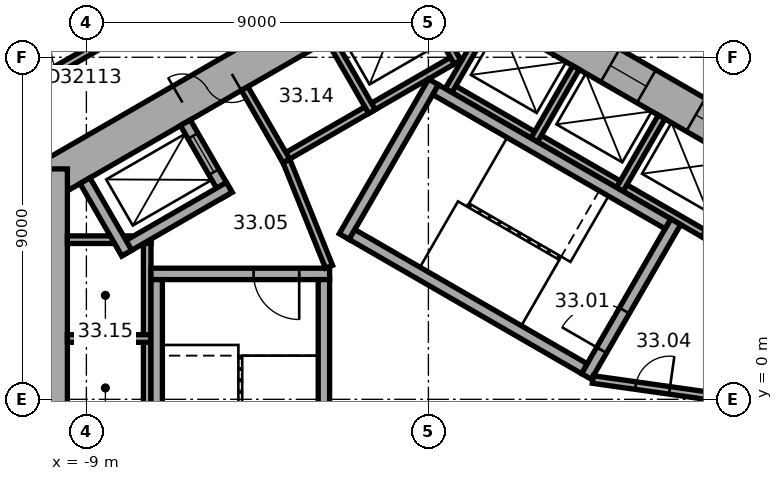
"""IFC4 building model, lengths in metres.
Left out: names, types, materials, properties, quantities, classifications, styles, units other than length and angle.
Written with IfcOpenShell. Run it as: python <this file> out.ifc"""

import sys

from ifc_helpers import new_model, si_unit, direction, frame, frame_2d, origin, place, context, subcontext, project, spatial, rectangle, extrude, element, fill, save


model = new_model("IFC4")
c1 = context("Model", 3, precision=1e-05, world=origin(), true_north=direction((0.0, 1.0)))
c2 = subcontext(c1, "Body", "Model", "MODEL_VIEW")
j1 = project(units=[si_unit("LENGTHUNIT", "METRE"), si_unit("PLANEANGLEUNIT", "RADIAN")], contexts=[c1])
p1 = place(None, origin())
s1 = spatial("IfcSite", under=j1, at=p1, CompositionType="ELEMENT")
p2 = place(p1, origin())
s2 = spatial("IfcBuilding", under=s1, at=p2, CompositionType="ELEMENT")
p3 = place(p2, frame((0.0, 0.0, 135.5)))
s3 = spatial("IfcBuildingStorey", under=s2, at=p3, CompositionType="ELEMENT", Elevation=135.5)
p4 = place(p3, frame((10.25, 5.629, 0.0), z_axis=(0.0, 0.0, 1.0), x_axis=(-0.866022616891, 0.50000482701, 0.0)))
e1 = element("IfcWall", 1, at=p4, inside=s3, PredefinedType="SHEAR", context=c2, shape_type="SweptSolid", body=[
    extrude(rectangle(XDim=12.125, YDim=1.0, at=frame_2d((6.062, 0.0))), origin(), (0.0, 0.0, 1.0), 3.7),
])
p5 = place(p4, frame((2.612, 0.0, 0.0)))
e2 = element("IfcOpeningElement", 2, at=p5, cuts=e1, PredefinedType="OPENING", context=c2, shape_type="SweptSolid", body=[
    extrude(rectangle(XDim=1.1, YDim=2.1, at=frame_2d((0.55, 1.05))), frame((0.0, 0.51, 0.0), z_axis=(0.0, -1.0, 0.0), x_axis=(1.0, 0.0, 0.0)), (0.0, 0.0, 1.0), 1.02),
])
p6 = place(p4, frame((5.212, 0.0, 0.0)))
e3 = element("IfcOpeningElement", 3, at=p6, cuts=e1, PredefinedType="OPENING", context=c2, shape_type="SweptSolid", body=[
    extrude(rectangle(XDim=1.1, YDim=2.1, at=frame_2d((0.55, 1.05))), frame((0.0, 0.51, 0.0), z_axis=(0.0, -1.0, 0.0), x_axis=(1.0, 0.0, 0.0)), (0.0, 0.0, 1.0), 1.02),
])
p7 = place(p4, frame((7.812, 0.0, 0.0)))
e4 = element("IfcOpeningElement", 4, at=p7, cuts=e1, PredefinedType="OPENING", context=c2, shape_type="SweptSolid", body=[
    extrude(rectangle(XDim=1.1, YDim=2.1, at=frame_2d((0.55, 1.05))), frame((0.0, 0.51, 0.0), z_axis=(0.0, -1.0, 0.0), x_axis=(1.0, 0.0, 0.0)), (0.0, 0.0, 1.0), 1.02),
])
p8 = place(p3, frame((0.25, 11.691, 0.0), z_axis=(0.0, 0.0, 1.0), x_axis=(-0.866022616891, -0.50000482701, 0.0)))
e5 = element("IfcWall", 5, at=p8, inside=s3, PredefinedType="SHEAR", context=c2, shape_type="SweptSolid", body=[
    extrude(rectangle(XDim=12.125, YDim=1.0, at=frame_2d((6.062, 0.0))), origin(), (0.0, 0.0, 1.0), 3.7),
])
p9 = place(p8, frame((6.262, 0.0, 0.0)))
e6 = element("IfcOpeningElement", 6, at=p9, cuts=e5, PredefinedType="OPENING", context=c2, shape_type="SweptSolid", body=[
    extrude(rectangle(XDim=1.5, YDim=2.1, at=frame_2d((0.75, 1.05))), frame((0.0, 0.51, 0.0), z_axis=(0.0, -1.0, 0.0), x_axis=(1.0, 0.0, 0.0)), (0.0, 0.0, 1.0), 1.02),
])
p10 = place(p8, frame((1.712, 0.0, 0.0)))
e7 = element("IfcOpeningElement", 7, at=p10, cuts=e5, PredefinedType="OPENING", context=c2, shape_type="SweptSolid", body=[
    extrude(rectangle(XDim=1.1, YDim=2.1, at=frame_2d((0.55, 1.05))), frame((0.0, 0.51, 0.0), z_axis=(0.0, -1.0, 0.0), x_axis=(1.0, 0.0, 0.0)), (0.0, 0.0, 1.0), 1.02),
])
p11 = place(p3, frame((-10.0, 6.062, 0.0), z_axis=(0.0, 0.0, 1.0), x_axis=(0.0, -1.0, 0.0)))
e8 = element("IfcWall", 8, at=p11, inside=s3, PredefinedType="SHEAR", context=c2, shape_type="SweptSolid", body=[
    extrude(rectangle(XDim=12.125, YDim=1.0, at=frame_2d((6.062, 0.0))), origin(), (0.0, 0.0, 1.0), 3.7),
])
p12 = place(p3, frame((7.424, 4.259, 0.0), z_axis=(0.0, 0.0, 1.0), x_axis=(-0.866026010844, 0.49999894854, 0.0)))
e9 = element("IfcWall", 9, at=p12, inside=s3, PredefinedType="PARTITIONING", context=c2, shape_type="SweptSolid", body=[
    extrude(rectangle(XDim=8.0, YDim=0.2, at=frame_2d((4.0, 0.0))), origin(), (0.0, 0.0, 1.0), 3.35),
])
for number, where, z_axis, x_axis in (
    (10, (7.287, 4.222, 0.0), (0.0, 0.0, 1.0), (0.5, 0.866, 0.0)),
    (11, (5.036, 5.522, 0.0), (0.0, 0.0, 1.0), (0.5, 0.866, 0.0)),
    (12, (2.784, 6.822, 0.0), (0.0, 0.0, 1.0), (0.5, 0.866, 0.0)),
    (13, (0.532, 8.122, 0.0), (0.0, 0.0, 1.0), (0.5, 0.866, 0.0)),
):
    element("IfcWall", number, at=place(p3, frame(where, z_axis=z_axis, x_axis=x_axis)), inside=s3, PredefinedType="PARTITIONING", context=c2, shape_type="SweptSolid", body=[
        extrude(rectangle(XDim=2.2, YDim=0.2, at=frame_2d((1.1, 0.0))), origin(), (0.0, 0.0, 1.0), 3.35),
    ])
p13 = place(p3, frame((0.803, 9.009, 0.0), z_axis=(0.0, 0.0, 1.0), x_axis=(-0.866028230842, -0.499995103361, 0.0)))
e14 = element("IfcWall", 14, at=p13, inside=s3, PredefinedType="PARTITIONING", context=c2, shape_type="SweptSolid", body=[
    extrude(rectangle(XDim=5.4, YDim=0.2, at=frame_2d((2.7, 0.0))), origin(), (0.0, 0.0, 1.0), 3.35),
])
p14 = place(p3, frame((0.767, 8.872, 0.0), z_axis=(0.0, 0.0, 1.0), x_axis=(-0.499994660107, 0.866028486751, 0.0)))
e15 = element("IfcWall", 15, at=p14, inside=s3, PredefinedType="PARTITIONING", context=c2, shape_type="SweptSolid", body=[
    extrude(rectangle(XDim=2.2, YDim=0.2, at=frame_2d((1.1, 0.0))), origin(), (0.0, 0.0, 1.0), 3.35),
])
for number, where, z_axis, x_axis in (
    (16, (-1.485, 7.572, 0.0), (0.0, 0.0, 1.0), (-0.5, 0.866, 0.0)),
    (17, (-3.737, 6.272, 0.0), (0.0, 0.0, 1.0), (-0.5, 0.866, 0.0)),
):
    element("IfcWall", number, at=place(p3, frame(where, z_axis=z_axis, x_axis=x_axis)), inside=s3, PredefinedType="PARTITIONING", context=c2, shape_type="SweptSolid", body=[
        extrude(rectangle(XDim=2.2, YDim=0.2, at=frame_2d((1.1, 0.0))), origin(), (0.0, 0.0, 1.0), 3.35),
    ])
p15 = place(p3, frame((-7.4, 4.3, 0.0), z_axis=(0.0, 0.0, 1.0), x_axis=(0.0, -1.0, 0.0)))
e18 = element("IfcWall", 18, at=p15, inside=s3, PredefinedType="PARTITIONING", context=c2, shape_type="SweptSolid", body=[
    extrude(rectangle(XDim=8.0, YDim=0.2, at=frame_2d((4.0, 0.0))), origin(), (0.0, 0.0, 1.0), 3.35),
])
for number, where, z_axis, x_axis in (
    (19, (-7.3, 4.2, 0.0), (0.0, 0.0, 1.0), (-1.0, 0.0, 0.0)),
    (20, (-7.3, 1.6, 0.0), (0.0, 0.0, 1.0), (-1.0, 0.0, 0.0)),
):
    element("IfcWall", number, at=place(p3, frame(where, z_axis=z_axis, x_axis=x_axis)), inside=s3, PredefinedType="PARTITIONING", context=c2, shape_type="SweptSolid", body=[
        extrude(rectangle(XDim=2.2, YDim=0.2, at=frame_2d((1.1, 0.0))), origin(), (0.0, 0.0, 1.0), 3.35),
    ])
p16 = place(p3, frame((4.158, 0.602, 0.0), z_axis=(0.0, 0.0, 1.0), x_axis=(0.499977259774, 0.866038532462, 0.0)))
e21 = element("IfcWall", 21, at=p16, inside=s3, PredefinedType="SHEAR", context=c2, shape_type="SweptSolid", body=[
    extrude(rectangle(XDim=4.7, YDim=0.3, at=frame_2d((2.35, 0.0))), origin(), (0.0, 0.0, 1.0), 3.35),
])
p17 = place(p16, frame((0.8, 0.0, 0.0)))
e22 = element("IfcOpeningElement", 22, at=p17, cuts=e21, PredefinedType="OPENING", context=c2, shape_type="SweptSolid", body=[
    extrude(rectangle(XDim=1.2, YDim=2.1, at=frame_2d((0.6, 1.05))), frame((0.0, 0.16, 0.0), z_axis=(0.0, -1.0, 0.0), x_axis=(1.0, 0.0, 0.0)), (0.0, 0.0, 1.0), 0.32),
])
p18 = place(p3, frame((-2.216, 4.282, 0.0), z_axis=(0.0, 0.0, 1.0), x_axis=(0.499977259774, 0.866038532462, 0.0)))
e23 = element("IfcWall", 23, at=p18, inside=s3, PredefinedType="SHEAR", context=c2, shape_type="SweptSolid", body=[
    extrude(rectangle(XDim=4.7, YDim=0.3, at=frame_2d((2.35, 0.0))), origin(), (0.0, 0.0, 1.0), 3.35),
])
for number, where, z_axis, x_axis in (
    (24, (4.103, 0.807, 0.0), (0.0, 0.0, 1.0), (-0.866, 0.5, 0.0)),
    (25, (6.303, 4.617, 0.0), (0.0, 0.0, 1.0), (-0.866, 0.5, 0.0)),
):
    element("IfcWall", number, at=place(p3, frame(where, z_axis=z_axis, x_axis=x_axis)), inside=s3, PredefinedType="SHEAR", context=c2, shape_type="SweptSolid", body=[
        extrude(rectangle(XDim=7.06, YDim=0.3, at=frame_2d((3.53, 0.0))), origin(), (0.0, 0.0, 1.0), 3.35),
    ])
p19 = place(p3, frame((-2.6, 3.3, 0.0), z_axis=(0.0, 0.0, 1.0), x_axis=(-1.0, 0.0, 0.0)))
e26 = element("IfcWall", 26, at=p19, inside=s3, PredefinedType="SHEAR", context=c2, shape_type="SweptSolid", body=[
    extrude(rectangle(XDim=4.7, YDim=0.3, at=frame_2d((2.35, 0.0))), origin(), (0.0, 0.0, 1.0), 3.35),
])
p20 = place(p19, frame((0.8, 0.0, 0.0)))
e27 = element("IfcOpeningElement", 27, at=p20, cuts=e26, PredefinedType="OPENING", context=c2, shape_type="SweptSolid", body=[
    extrude(rectangle(XDim=1.2, YDim=2.1, at=frame_2d((0.6, 1.05))), frame((0.0, 0.16, 0.0), z_axis=(0.0, -1.0, 0.0), x_axis=(1.0, 0.0, 0.0)), (0.0, 0.0, 1.0), 0.32),
])
for number, where, z_axis, x_axis in (
    (28, (-2.75, 3.15, 0.0), (0.0, 0.0, 1.0), (0.0, -1.0, 0.0)),
    (29, (-7.15, 3.15, 0.0), (0.0, 0.0, 1.0), (0.0, -1.0, 0.0)),
):
    element("IfcWall", number, at=place(p3, frame(where, z_axis=z_axis, x_axis=x_axis)), inside=s3, PredefinedType="SHEAR", context=c2, shape_type="SweptSolid", body=[
        extrude(rectangle(XDim=7.06, YDim=0.3, at=frame_2d((3.53, 0.0))), origin(), (0.0, 0.0, 1.0), 3.35),
    ])
p21 = place(p3, frame((4.327, 0.521, 0.0), z_axis=(0.0, 0.0, 1.0), x_axis=(0.990124376366, -0.14019172346, 0.0)))
e30 = element("IfcWall", 30, at=p21, inside=s3, PredefinedType="PARTITIONING", context=c2, shape_type="SweptSolid", body=[
    extrude(rectangle(XDim=3.002, YDim=0.2, at=frame_2d((1.501, 0.0))), origin(), (0.0, 0.0, 1.0), 3.35),
])
p22 = place(p21, frame((1.138, 0.0, 0.0)))
e31 = element("IfcOpeningElement", 31, at=p22, cuts=e30, PredefinedType="OPENING", context=c2, shape_type="SweptSolid", body=[
    extrude(rectangle(XDim=0.9, YDim=2.1, at=frame_2d((0.45, 1.05))), frame((0.0, 0.11, 0.0), z_axis=(0.0, -1.0, 0.0), x_axis=(1.0, 0.0, 0.0)), (0.0, 0.0, 1.0), 0.22),
])
p23 = place(p3, frame((-5.295, 5.372, 0.0), z_axis=(0.0, 0.0, 1.0), x_axis=(-0.500077893725, 0.86598042715, 0.0)))
e32 = element("IfcWall", 32, at=p23, inside=s3, PredefinedType="SHEAR", context=c2, shape_type="SweptSolid", body=[
    extrude(rectangle(XDim=2.2, YDim=0.3, at=frame_2d((1.1, 0.0))), origin(), (0.0, 0.0, 1.0), 3.35),
])
p24 = place(p23, frame((0.7, 0.0, 0.0)))
e33 = element("IfcOpeningElement", 33, at=p24, cuts=e32, PredefinedType="OPENING", context=c2, shape_type="SweptSolid", body=[
    extrude(rectangle(XDim=1.1, YDim=2.1, at=frame_2d((0.55, 1.05))), frame((0.0, 0.16, 0.0), z_axis=(0.0, -1.0, 0.0), x_axis=(1.0, 0.0, 0.0)), (0.0, 0.0, 1.0), 0.32),
])
p25 = place(p3, frame((-5.24, 5.577, 0.0), z_axis=(0.0, 0.0, 1.0), x_axis=(-0.866014461049, -0.500018952895, 0.0)))
e34 = element("IfcWall", 34, at=p25, inside=s3, PredefinedType="SHEAR", context=c2, shape_type="SweptSolid", body=[
    extrude(rectangle(XDim=3.35, YDim=0.3, at=frame_2d((1.675, 0.0))), origin(), (0.0, 0.0, 1.0), 3.35),
])
p26 = place(p3, frame((-7.937, 3.847, 0.0), z_axis=(0.0, 0.0, 1.0), x_axis=(-0.50002983664, 0.866008176907, 0.0)))
e35 = element("IfcWall", 35, at=p26, inside=s3, PredefinedType="SHEAR", context=c2, shape_type="SweptSolid", body=[
    extrude(rectangle(XDim=2.2, YDim=0.3, at=frame_2d((1.1, 0.0))), origin(), (0.0, 0.0, 1.0), 3.35),
])
p27 = place(p3, frame((-2.615, 3.487, 0.0), z_axis=(0.0, 0.0, 1.0), x_axis=(-0.373576831041, 0.92759924068, 0.0)))
e36 = element("IfcWall", 36, at=p27, inside=s3, PredefinedType="PARTITIONING", context=c2, shape_type="SweptSolid", body=[
    extrude(rectangle(XDim=3.002, YDim=0.2, at=frame_2d((1.501, 0.0))), origin(), (0.0, 0.0, 1.0), 3.35),
])
p28 = place(p3, frame((-4.209, 11.888, 0.0), z_axis=(0.0, 0.0, 1.0), x_axis=(-0.866020930448, -0.500007747966, 0.0)))
e37 = element("IfcWall", 37, at=p28, inside=s3, PredefinedType="PARTITIONING", context=c2, shape_type="SweptSolid", body=[
    extrude(rectangle(XDim=8.321, YDim=0.2, at=frame_2d((4.161, 0.0))), origin(), (0.0, 0.0, 1.0), 3.35),
])
p29 = place(p28, frame((5.439, 0.0, 0.0)))
e38 = element("IfcOpeningElement", 38, at=p29, cuts=e37, PredefinedType="OPENING", context=c2, shape_type="SweptSolid", body=[
    extrude(rectangle(XDim=1.0, YDim=2.1, at=frame_2d((0.5, 1.05))), frame((0.0, 0.11, 0.0), z_axis=(0.0, -1.0, 0.0), x_axis=(1.0, 0.0, 0.0)), (0.0, 0.0, 1.0), 0.22),
])
p30 = place(p3, frame((11.646, 8.981, 0.0), z_axis=(0.0, 0.0, 1.0), x_axis=(-0.866027142779, 0.499996987961, 0.0)))
e39 = element("IfcWall", 39, at=p30, inside=s3, PredefinedType="PARTITIONING", context=c2, shape_type="SweptSolid", body=[
    extrude(rectangle(XDim=9.597, YDim=0.2, at=frame_2d((4.798, 0.0))), origin(), (0.0, 0.0, 1.0), 3.35),
])
p31 = place(p30, frame((1.331, 0.0, 0.0)))
e40 = element("IfcOpeningElement", 40, at=p31, cuts=e39, PredefinedType="OPENING", context=c2, shape_type="SweptSolid", body=[
    extrude(rectangle(XDim=1.0, YDim=2.1, at=frame_2d((0.5, 1.05))), frame((0.0, 0.11, 0.0), z_axis=(0.0, -1.0, 0.0), x_axis=(1.0, 0.0, 0.0)), (0.0, 0.0, 1.0), 0.22),
])
p32 = place(p30, frame((5.042, 0.0, 0.0)))
e41 = element("IfcOpeningElement", 41, at=p32, cuts=e39, PredefinedType="OPENING", context=c2, shape_type="SweptSolid", body=[
    extrude(rectangle(XDim=1.0, YDim=2.1, at=frame_2d((0.5, 1.05))), frame((0.0, 0.11, 0.0), z_axis=(0.0, -1.0, 0.0), x_axis=(1.0, 0.0, 0.0)), (0.0, 0.0, 1.0), 0.22),
])
p33 = place(p30, frame((8.01, 0.0, 0.0)))
e42 = element("IfcOpeningElement", 42, at=p33, cuts=e39, PredefinedType="OPENING", context=c2, shape_type="SweptSolid", body=[
    extrude(rectangle(XDim=1.0, YDim=2.1, at=frame_2d((0.5, 1.05))), frame((0.0, 0.11, 0.0), z_axis=(0.0, -1.0, 0.0), x_axis=(1.0, 0.0, 0.0)), (0.0, 0.0, 1.0), 0.22),
])
p34 = place(p9, origin())
e43 = element("IfcDoor", 43, at=p34, inside=s3, OperationType="DOUBLE_DOOR_SINGLE_SWING", PredefinedType="DOOR", context=c2, shape_type="SweptSolid", body=[
    extrude(rectangle(XDim=1.5, YDim=2.1, at=frame_2d((0.75, 1.05))), frame((0.0, 0.025, 0.0), z_axis=(0.0, -1.0, 0.0), x_axis=(1.0, 0.0, 0.0)), (0.0, 0.0, 1.0), 0.05),
])
fill(e6, e43)
p35 = place(p17, origin())
e44 = element("IfcDoor", 44, at=p35, inside=s3, OperationType="SINGLE_SWING_RIGHT", PredefinedType="DOOR", context=c2, shape_type="SweptSolid", body=[
    extrude(rectangle(XDim=1.2, YDim=2.1, at=frame_2d((0.6, 1.05))), frame((0.0, 0.025, 0.0), z_axis=(0.0, -1.0, 0.0), x_axis=(1.0, 0.0, 0.0)), (0.0, 0.0, 1.0), 0.05),
])
fill(e22, e44)
p36 = place(p20, origin())
e45 = element("IfcDoor", 45, at=p36, inside=s3, OperationType="SINGLE_SWING_RIGHT", PredefinedType="DOOR", context=c2, shape_type="SweptSolid", body=[
    extrude(rectangle(XDim=1.2, YDim=2.1, at=frame_2d((0.6, 1.05))), frame((0.0, 0.025, 0.0), z_axis=(0.0, -1.0, 0.0), x_axis=(1.0, 0.0, 0.0)), (0.0, 0.0, 1.0), 0.05),
])
fill(e27, e45)
p37 = place(p22, origin())
e46 = element("IfcDoor", 46, at=p37, inside=s3, OperationType="SINGLE_SWING_LEFT", PredefinedType="DOOR", context=c2, shape_type="SweptSolid", body=[
    extrude(rectangle(XDim=0.9, YDim=2.1, at=frame_2d((0.45, 1.05))), frame((0.0, 0.025, 0.0), z_axis=(0.0, -1.0, 0.0), x_axis=(1.0, 0.0, 0.0)), (0.0, 0.0, 1.0), 0.05),
])
fill(e31, e46)
p38 = place(p24, origin())
e47 = element("IfcDoor", 47, at=p38, inside=s3, OperationType="DOUBLE_DOOR_SLIDING", PredefinedType="DOOR", context=c2, shape_type="SweptSolid", body=[
    extrude(rectangle(XDim=1.1, YDim=2.1, at=frame_2d((0.55, 1.05))), frame((0.0, 0.025, 0.0), z_axis=(0.0, -1.0, 0.0), x_axis=(1.0, 0.0, 0.0)), (0.0, 0.0, 1.0), 0.05),
])
fill(e33, e47)
p39 = place(p5, origin())
e48 = element("IfcDoor", 48, at=p39, inside=s3, OperationType="DOUBLE_DOOR_SLIDING", PredefinedType="DOOR", context=c2, shape_type="SweptSolid", body=[
    extrude(rectangle(XDim=1.1, YDim=2.1, at=frame_2d((0.55, 1.05))), frame((0.0, 0.025, 0.0), z_axis=(0.0, -1.0, 0.0), x_axis=(1.0, 0.0, 0.0)), (0.0, 0.0, 1.0), 0.05),
])
fill(e2, e48)
p40 = place(p6, origin())
e49 = element("IfcDoor", 49, at=p40, inside=s3, OperationType="DOUBLE_DOOR_SLIDING", PredefinedType="DOOR", context=c2, shape_type="SweptSolid", body=[
    extrude(rectangle(XDim=1.1, YDim=2.1, at=frame_2d((0.55, 1.05))), frame((0.0, 0.025, 0.0), z_axis=(0.0, -1.0, 0.0), x_axis=(1.0, 0.0, 0.0)), (0.0, 0.0, 1.0), 0.05),
])
fill(e3, e49)
p41 = place(p29, origin())
e50 = element("IfcDoor", 50, at=p41, inside=s3, OperationType="SINGLE_SWING_LEFT", PredefinedType="DOOR", context=c2, shape_type="SweptSolid", body=[
    extrude(rectangle(XDim=1.0, YDim=2.1, at=frame_2d((0.5, 1.05))), frame((0.0, 0.025, 0.0), z_axis=(0.0, -1.0, 0.0), x_axis=(1.0, 0.0, 0.0)), (0.0, 0.0, 1.0), 0.05),
])
fill(e38, e50)
save(model, sys.argv[1])
